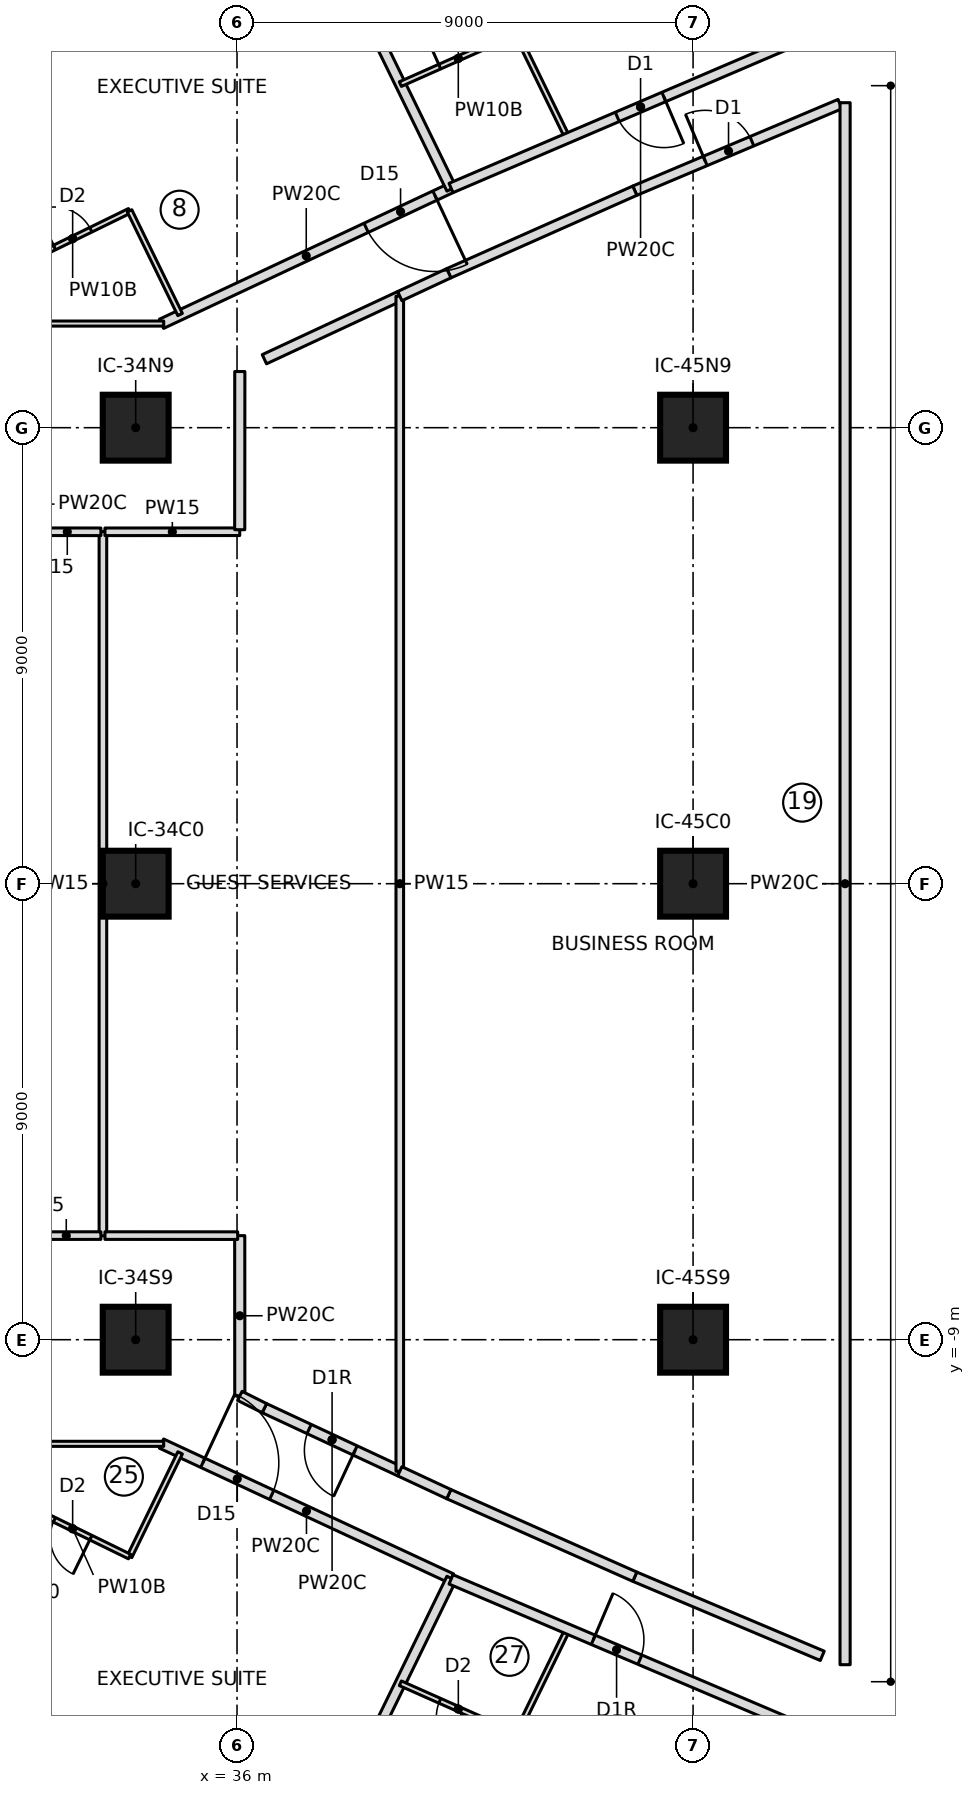
"""IFC4 building model, lengths in metres.
Left out: names, types, materials, properties, quantities, classifications, styles, units other than length and angle.
Written with IfcOpenShell. Run it as: python <this file> out.ifc"""

import sys

from ifc_helpers import new_model, si_unit, direction, frame, frame_2d, origin, origin_2d, place, context, subcontext, project, spatial, rectangle, extrude, element, fill, save


model = new_model("IFC4")
c1 = context("Model", 3, precision=1e-05, world=origin(), true_north=direction((0.0, 1.0)))
c2 = subcontext(c1, "Body", "Model", "MODEL_VIEW")
j1 = project(units=[si_unit("LENGTHUNIT", "METRE"), si_unit("PLANEANGLEUNIT", "RADIAN")], contexts=[c1])
p1 = place(None, origin())
s1 = spatial("IfcSite", under=j1, at=p1, CompositionType="ELEMENT")
p2 = place(p1, origin())
s2 = spatial("IfcBuilding", under=s1, at=p2, CompositionType="ELEMENT")
p3 = place(p2, frame((0.0, 0.0, 50.25)))
s3 = spatial("IfcBuildingStorey", under=s2, at=p3, CompositionType="ELEMENT", Elevation=50.25)
for number, where, z_axis, x_axis in (
    (1, (34.0, -9.0, 0.0), (0.0, 0.0, 1.0), (1.0, 0.0, 0.0)),
    (2, (34.0, 0.0, 0.0), (0.0, 0.0, 1.0), (1.0, 0.0, 0.0)),
    (3, (34.0, 9.0, 0.0), (0.0, 0.0, 1.0), (1.0, 0.0, 0.0)),
    (4, (45.0, -9.0, 0.0), (0.0, 0.0, 1.0), (1.0, 0.0, 0.0)),
    (5, (45.0, 0.0, 0.0), (0.0, 0.0, 1.0), (1.0, 0.0, 0.0)),
    (6, (45.0, 9.0, 0.0), (0.0, 0.0, 1.0), (1.0, 0.0, 0.0)),
):
    element("IfcColumn", number, at=place(p3, frame(where, z_axis=z_axis, x_axis=x_axis)), inside=s3, PredefinedType="COLUMN", context=c2, shape_type="SweptSolid", body=[
        extrude(rectangle(XDim=1.3, YDim=1.3, at=origin_2d()), origin(), (0.0, 0.0, 1.0), 3.55),
    ])
p4 = place(p3, frame((40.223, 13.73, 0.0), z_axis=(0.0, 0.0, 1.0), x_axis=(-0.905363217407, -0.424638015923, 0.0)))
e7 = element("IfcWall", 7, at=p4, inside=s3, PredefinedType="PARTITIONING", context=c2, shape_type="SweptSolid", body=[
    extrude(rectangle(XDim=6.312, YDim=0.2, at=frame_2d((3.156, 0.0))), origin(), (0.0, 0.0, 1.0), 3.25),
])
p5 = place(p4, frame((0.35, 0.0, 0.0)))
e8 = element("IfcOpeningElement", 8, at=p5, cuts=e7, PredefinedType="OPENING", context=c2, shape_type="SweptSolid", body=[
    extrude(rectangle(XDim=1.5, YDim=2.1, at=frame_2d((0.75, 1.05))), frame((0.0, 0.11, 0.0), z_axis=(0.0, -1.0, 0.0), x_axis=(1.0, 0.0, 0.0)), (0.0, 0.0, 1.0), 0.22),
])
p6 = place(p3, frame((31.633, 12.182, 0.0), z_axis=(0.0, 0.0, 1.0), x_axis=(0.89845285455, 0.439070003702, 0.0)))
e9 = element("IfcWall", 9, at=p6, inside=s3, PredefinedType="PARTITIONING", context=c2, shape_type="SweptSolid", body=[
    extrude(rectangle(XDim=2.5, YDim=0.1, at=frame_2d((1.25, 0.0))), origin(), (0.0, 0.0, 1.0), 3.25),
])
p7 = place(p6, frame((0.85, 0.0, 0.0)))
e10 = element("IfcOpeningElement", 10, at=p7, cuts=e9, PredefinedType="OPENING", context=c2, shape_type="SweptSolid", body=[
    extrude(rectangle(XDim=0.8, YDim=2.1, at=frame_2d((0.4, 1.05))), frame((0.0, 0.06, 0.0), z_axis=(0.0, -1.0, 0.0), x_axis=(1.0, 0.0, 0.0)), (0.0, 0.0, 1.0), 0.12),
])
p8 = place(p3, frame((33.879, 13.28, 0.0), z_axis=(0.0, 0.0, 1.0), x_axis=(0.438227154656, -0.898864261678, 0.0)))
e11 = element("IfcWall", 11, at=p8, inside=s3, PredefinedType="PARTITIONING", context=c2, shape_type="SweptSolid", body=[
    extrude(rectangle(XDim=2.277, YDim=0.1, at=frame_2d((1.138, 0.0))), origin(), (0.0, 0.0, 1.0), 3.25),
])
p9 = place(p3, frame((40.232, 13.712, 0.0), z_axis=(0.0, 0.0, 1.0), x_axis=(-0.438202247191, 0.898876404494, 0.0)))
e12 = element("IfcWall", 12, at=p9, inside=s3, PredefinedType="PARTITIONING", context=c2, shape_type="SweptSolid", body=[
    extrude(rectangle(XDim=7.605, YDim=0.2, at=frame_2d((3.802, 0.0))), origin(), (0.0, 0.0, 1.0), 3.25),
])
p10 = place(p3, frame((39.223, 15.781, 0.0), z_axis=(0.0, 0.0, 1.0), x_axis=(0.914000607553, 0.405712816401, 0.0)))
e13 = element("IfcWall", 13, at=p10, inside=s3, PredefinedType="PARTITIONING", context=c2, shape_type="SweptSolid", body=[
    extrude(rectangle(XDim=2.501, YDim=0.1, at=frame_2d((1.251, 0.0))), origin(), (0.0, 0.0, 1.0), 3.25),
])
p11 = place(p10, frame((0.85, 0.0, 0.0)))
e14 = element("IfcOpeningElement", 14, at=p11, cuts=e13, PredefinedType="OPENING", context=c2, shape_type="SweptSolid", body=[
    extrude(rectangle(XDim=0.8, YDim=2.1, at=frame_2d((0.4, 1.05))), frame((0.0, 0.06, 0.0), z_axis=(0.0, -1.0, 0.0), x_axis=(1.0, 0.0, 0.0)), (0.0, 0.0, 1.0), 0.12),
])
p12 = place(p3, frame((41.51, 16.796, 0.0), z_axis=(0.0, 0.0, 1.0), x_axis=(0.4381470535, -0.898903309321, 0.0)))
e15 = element("IfcWall", 15, at=p12, inside=s3, PredefinedType="PARTITIONING", context=c2, shape_type="SweptSolid", body=[
    extrude(rectangle(XDim=2.278, YDim=0.1, at=frame_2d((1.139, 0.0))), origin(), (0.0, 0.0, 1.0), 3.25),
])
p13 = place(p3, frame((34.509, -11.05, 0.0), z_axis=(0.0, 0.0, 1.0), x_axis=(0.906710104698, -0.421754414368, 0.0)))
e16 = element("IfcWall", 16, at=p13, inside=s3, PredefinedType="PARTITIONING", context=c2, shape_type="SweptSolid", body=[
    extrude(rectangle(XDim=6.312, YDim=0.2, at=frame_2d((3.156, 0.0))), origin(), (0.0, 0.0, 1.0), 3.25),
])
p14 = place(p13, frame((0.9, 0.0, 0.0)))
e17 = element("IfcOpeningElement", 17, at=p14, cuts=e16, PredefinedType="OPENING", context=c2, shape_type="SweptSolid", body=[
    extrude(rectangle(XDim=1.5, YDim=2.1, at=frame_2d((0.75, 1.05))), frame((0.0, 0.11, 0.0), z_axis=(0.0, -1.0, 0.0), x_axis=(1.0, 0.0, 0.0)), (0.0, 0.0, 1.0), 0.22),
])
p15 = place(p3, frame((34.877, -11.233, 0.0), z_axis=(0.0, 0.0, 1.0), x_axis=(-0.438227154656, -0.898864261678, 0.0)))
e18 = element("IfcWall", 18, at=p15, inside=s3, PredefinedType="PARTITIONING", context=c2, shape_type="SweptSolid", body=[
    extrude(rectangle(XDim=2.277, YDim=0.1, at=frame_2d((1.138, 0.0))), origin(), (0.0, 0.0, 1.0), 3.25),
])
p16 = place(p3, frame((33.879, -13.28, 0.0), z_axis=(0.0, 0.0, 1.0), x_axis=(-0.89845285455, 0.439070003702, 0.0)))
e19 = element("IfcWall", 19, at=p16, inside=s3, PredefinedType="PARTITIONING", context=c2, shape_type="SweptSolid", body=[
    extrude(rectangle(XDim=2.5, YDim=0.1, at=frame_2d((1.25, 0.0))), origin(), (0.0, 0.0, 1.0), 3.25),
])
p17 = place(p16, frame((0.85, 0.0, 0.0)))
e20 = element("IfcOpeningElement", 20, at=p17, cuts=e19, PredefinedType="OPENING", context=c2, shape_type="SweptSolid", body=[
    extrude(rectangle(XDim=0.8, YDim=2.1, at=frame_2d((0.4, 1.05))), frame((0.0, 0.06, 0.0), z_axis=(0.0, -1.0, 0.0), x_axis=(1.0, 0.0, 0.0)), (0.0, 0.0, 1.0), 0.12),
])
p18 = place(p3, frame((36.899, -20.548, 0.0), z_axis=(0.0, 0.0, 1.0), x_axis=(0.438202247191, 0.898876404494, 0.0)))
e21 = element("IfcWall", 21, at=p18, inside=s3, PredefinedType="PARTITIONING", context=c2, shape_type="SweptSolid", body=[
    extrude(rectangle(XDim=7.605, YDim=0.2, at=frame_2d((3.802, 0.0))), origin(), (0.0, 0.0, 1.0), 3.25),
])
p19 = place(p3, frame((42.508, -14.748, 0.0), z_axis=(0.0, 0.0, 1.0), x_axis=(-0.4381470535, -0.898903309321, 0.0)))
e22 = element("IfcWall", 22, at=p19, inside=s3, PredefinedType="PARTITIONING", context=c2, shape_type="SweptSolid", body=[
    extrude(rectangle(XDim=2.278, YDim=0.1, at=frame_2d((1.139, 0.0))), origin(), (0.0, 0.0, 1.0), 3.25),
])
p20 = place(p3, frame((41.51, -16.796, 0.0), z_axis=(0.0, 0.0, 1.0), x_axis=(-0.914000607553, 0.405712816401, 0.0)))
e23 = element("IfcWall", 23, at=p20, inside=s3, PredefinedType="PARTITIONING", context=c2, shape_type="SweptSolid", body=[
    extrude(rectangle(XDim=2.501, YDim=0.1, at=frame_2d((1.251, 0.0))), origin(), (0.0, 0.0, 1.0), 3.25),
])
p21 = place(p20, frame((0.85, 0.0, 0.0)))
e24 = element("IfcOpeningElement", 24, at=p21, cuts=e23, PredefinedType="OPENING", context=c2, shape_type="SweptSolid", body=[
    extrude(rectangle(XDim=0.8, YDim=2.1, at=frame_2d((0.4, 1.05))), frame((0.0, 0.06, 0.0), z_axis=(0.0, -1.0, 0.0), x_axis=(1.0, 0.0, 0.0)), (0.0, 0.0, 1.0), 0.12),
])
p22 = place(p3, frame((33.353, -6.95, 0.0), z_axis=(0.0, 0.0, 1.0), x_axis=(0.0, 1.0, 0.0)))
e25 = element("IfcWall", 25, at=p22, inside=s3, PredefinedType="PARTITIONING", context=c2, shape_type="SweptSolid", body=[
    extrude(rectangle(XDim=13.9, YDim=0.15, at=frame_2d((6.95, 0.0))), origin(), (0.0, 0.0, 1.0), 3.25),
])
p23 = place(p3, frame((39.212, -11.597, 0.0), z_axis=(0.0, 0.0, 1.0), x_axis=(-0.906348100281, 0.422531798943, 0.0)))
e26 = element("IfcWall", 26, at=p23, inside=s3, PredefinedType="PARTITIONING", context=c2, shape_type="SweptSolid", body=[
    extrude(rectangle(XDim=2.948, YDim=0.2, at=frame_2d((1.474, 0.0))), origin(), (0.0, 0.0, 1.0), 3.25),
])
p24 = place(p23, frame((0.974, 0.0, 0.0)))
e27 = element("IfcOpeningElement", 27, at=p24, cuts=e26, PredefinedType="OPENING", context=c2, shape_type="SweptSolid", body=[
    extrude(rectangle(XDim=1.0, YDim=2.1, at=frame_2d((0.5, 1.05))), frame((0.0, 0.11, 0.0), z_axis=(0.0, -1.0, 0.0), x_axis=(1.0, 0.0, 0.0)), (0.0, 0.0, 1.0), 0.22),
])
p25 = place(p3, frame((36.54, 10.351, 0.0), z_axis=(0.0, 0.0, 1.0), x_axis=(0.906348100281, 0.422531798943, 0.0)))
e28 = element("IfcWall", 28, at=p25, inside=s3, PredefinedType="PARTITIONING", context=c2, shape_type="SweptSolid", body=[
    extrude(rectangle(XDim=2.948, YDim=0.2, at=frame_2d((1.474, 0.0))), origin(), (0.0, 0.0, 1.0), 3.25),
])
p26 = place(p3, frame((39.212, -11.597, 0.0), z_axis=(0.0, 0.0, 1.0), x_axis=(0.0, 1.0, 0.0)))
e29 = element("IfcWall", 29, at=p26, inside=s3, PredefinedType="PARTITIONING", context=c2, shape_type="SweptSolid", body=[
    extrude(rectangle(XDim=23.193, YDim=0.15, at=frame_2d((11.597, 0.0))), origin(), (0.0, 0.0, 1.0), 3.25),
])
p27 = place(p3, frame((43.85, 13.677, 0.0), z_axis=(0.0, 0.0, 1.0), x_axis=(0.921265924084, 0.388933281068, 0.0)))
e30 = element("IfcWall", 30, at=p27, inside=s3, PredefinedType="PARTITIONING", context=c2, shape_type="SweptSolid", body=[
    extrude(rectangle(XDim=4.396, YDim=0.2, at=frame_2d((2.198, 0.0))), origin(), (0.0, 0.0, 1.0), 3.25),
])
p28 = place(p27, frame((1.508, 0.0, 0.0)))
e31 = element("IfcOpeningElement", 31, at=p28, cuts=e30, PredefinedType="OPENING", context=c2, shape_type="SweptSolid", body=[
    extrude(rectangle(XDim=1.0, YDim=2.1, at=frame_2d((0.5, 1.05))), frame((0.0, 0.11, 0.0), z_axis=(0.0, -1.0, 0.0), x_axis=(1.0, 0.0, 0.0)), (0.0, 0.0, 1.0), 0.22),
])
p29 = place(p3, frame((40.18, 12.048, 0.0), z_axis=(0.0, 0.0, 1.0), x_axis=(0.913986953061, 0.405743576209, 0.0)))
e32 = element("IfcWall", 32, at=p29, inside=s3, PredefinedType="PARTITIONING", context=c2, shape_type="SweptSolid", body=[
    extrude(rectangle(XDim=4.016, YDim=0.2, at=frame_2d((2.008, 0.0))), origin(), (0.0, 0.0, 1.0), 3.25),
])
p30 = place(p3, frame((47.55, -15.239, 0.0), z_axis=(0.0, 0.0, 1.0), x_axis=(-0.921269894054, 0.388923877269, 0.0)))
e33 = element("IfcWall", 33, at=p30, inside=s3, PredefinedType="PARTITIONING", context=c2, shape_type="SweptSolid", body=[
    extrude(rectangle(XDim=4.016, YDim=0.2, at=frame_2d((2.008, 0.0))), origin(), (0.0, 0.0, 1.0), 3.25),
])
p31 = place(p3, frame((43.85, -13.677, 0.0), z_axis=(0.0, 0.0, 1.0), x_axis=(-0.913986953061, 0.405743576209, 0.0)))
e34 = element("IfcWall", 34, at=p31, inside=s3, PredefinedType="PARTITIONING", context=c2, shape_type="SweptSolid", body=[
    extrude(rectangle(XDim=4.016, YDim=0.2, at=frame_2d((2.008, 0.0))), origin(), (0.0, 0.0, 1.0), 3.25),
])
for number, where, z_axis, x_axis in (
    (35, (40.18, -12.048, 0.0), (0.0, 0.0, 1.0), (-0.906, 0.423, 0.0)),
    (36, (39.212, 11.597, 0.0), (0.0, 0.0, 1.0), (0.906, 0.423, 0.0)),
):
    element("IfcWall", number, at=place(p3, frame(where, z_axis=z_axis, x_axis=x_axis)), inside=s3, PredefinedType="PARTITIONING", context=c2, shape_type="SweptSolid", body=[
        extrude(rectangle(XDim=1.068, YDim=0.2, at=frame_2d((0.534, 0.0))), origin(), (0.0, 0.0, 1.0), 3.25),
    ])
for number, where, z_axis, x_axis in (
    (37, (34.553, 11.055, 0.0), (0.0, 0.0, 1.0), (-1.0, 0.0, 0.0)),
    (38, (32.182, -11.055, 0.0), (0.0, 0.0, 1.0), (1.0, 0.0, 0.0)),
):
    element("IfcWall", number, at=place(p3, frame(where, z_axis=z_axis, x_axis=x_axis)), inside=s3, PredefinedType="PARTITIONING", context=c2, shape_type="SweptSolid", body=[
        extrude(rectangle(XDim=2.371, YDim=0.1, at=frame_2d((1.186, 0.0))), origin(), (0.0, 0.0, 1.0), 3.25),
    ])
p32 = place(p3, frame((47.704, 16.931, 0.0), z_axis=(0.0, 0.0, 1.0), x_axis=(-0.919360612497, -0.39341589214, 0.0)))
e39 = element("IfcWall", 39, at=p32, inside=s3, PredefinedType="PARTITIONING", context=c2, shape_type="SweptSolid", body=[
    extrude(rectangle(XDim=8.137, YDim=0.2, at=frame_2d((4.068, 0.0))), origin(), (0.0, 0.0, 1.0), 3.25),
])
p33 = place(p32, frame((3.568, 0.0, 0.0)))
e40 = element("IfcOpeningElement", 40, at=p33, cuts=e39, PredefinedType="OPENING", context=c2, shape_type="SweptSolid", body=[
    extrude(rectangle(XDim=1.0, YDim=2.1, at=frame_2d((0.5, 1.05))), frame((0.0, 0.11, 0.0), z_axis=(0.0, -1.0, 0.0), x_axis=(1.0, 0.0, 0.0)), (0.0, 0.0, 1.0), 0.22),
])
p34 = place(p3, frame((40.223, -13.73, 0.0), z_axis=(0.0, 0.0, 1.0), x_axis=(0.920292261621, -0.391231585127, 0.0)))
e41 = element("IfcWall", 41, at=p34, inside=s3, PredefinedType="PARTITIONING", context=c2, shape_type="SweptSolid", body=[
    extrude(rectangle(XDim=8.129, YDim=0.2, at=frame_2d((4.064, 0.0))), origin(), (0.0, 0.0, 1.0), 3.25),
])
p35 = place(p34, frame((3.05, 0.0, 0.0)))
e42 = element("IfcOpeningElement", 42, at=p35, cuts=e41, PredefinedType="OPENING", context=c2, shape_type="SweptSolid", body=[
    extrude(rectangle(XDim=1.0, YDim=2.1, at=frame_2d((0.5, 1.05))), frame((0.0, 0.11, 0.0), z_axis=(0.0, -1.0, 0.0), x_axis=(1.0, 0.0, 0.0)), (0.0, 0.0, 1.0), 0.22),
])
p36 = place(p3, frame((33.313, -6.945, 0.0), z_axis=(0.0, 0.0, 1.0), x_axis=(-0.999999744625, -0.00071466839, 0.0)))
e43 = element("IfcWall", 43, at=p36, inside=s3, PredefinedType="PARTITIONING", context=c2, shape_type="SweptSolid", body=[
    extrude(rectangle(XDim=1.366, YDim=0.15, at=frame_2d((0.683, 0.0))), origin(), (0.0, 0.0, 1.0), 3.25),
])
p37 = place(p3, frame((31.987, 6.946, 0.0), z_axis=(0.0, 0.0, 1.0), x_axis=(0.999999728974, -0.000736241288, 0.0)))
e44 = element("IfcWall", 44, at=p37, inside=s3, PredefinedType="PARTITIONING", context=c2, shape_type="SweptSolid", body=[
    extrude(rectangle(XDim=1.326, YDim=0.15, at=frame_2d((0.663, 0.0))), origin(), (0.0, 0.0, 1.0), 3.25),
])
p38 = place(p3, frame((36.055, -10.108, 0.0), z_axis=(0.0, 0.0, 1.0), x_axis=(-0.000540415269, 0.999999853976, 0.0)))
e45 = element("IfcWall", 45, at=p38, inside=s3, PredefinedType="PARTITIONING", context=c2, shape_type="SweptSolid", body=[
    extrude(rectangle(XDim=3.162, YDim=0.2, at=frame_2d((1.581, 0.0))), origin(), (0.0, 0.0, 1.0), 3.25),
])
p39 = place(p3, frame((36.013, -6.946, 0.0), z_axis=(0.0, 0.0, 1.0), x_axis=(-0.999999930528, 0.000372751815, 0.0)))
e46 = element("IfcWall", 46, at=p39, inside=s3, PredefinedType="PARTITIONING", context=c2, shape_type="SweptSolid", body=[
    extrude(rectangle(XDim=2.62, YDim=0.15, at=frame_2d((1.31, 0.0))), origin(), (0.0, 0.0, 1.0), 3.25),
])
p40 = place(p3, frame((33.393, 6.945, 0.0), z_axis=(0.0, 0.0, 1.0), x_axis=(0.999999932604, 0.000367140866, 0.0)))
e47 = element("IfcWall", 47, at=p40, inside=s3, PredefinedType="PARTITIONING", context=c2, shape_type="SweptSolid", body=[
    extrude(rectangle(XDim=2.66, YDim=0.15, at=frame_2d((1.33, 0.0))), origin(), (0.0, 0.0, 1.0), 3.25),
])
p41 = place(p3, frame((36.053, 6.986, 0.0), z_axis=(0.0, 0.0, 1.0), x_axis=(0.000547345293, 0.999999850207, 0.0)))
e48 = element("IfcWall", 48, at=p41, inside=s3, PredefinedType="PARTITIONING", context=c2, shape_type="SweptSolid", body=[
    extrude(rectangle(XDim=3.122, YDim=0.2, at=frame_2d((1.561, 0.0))), origin(), (0.0, 0.0, 1.0), 3.25),
])
p42 = place(p3, frame((48.0, 15.414, 0.0), z_axis=(0.0, 0.0, 1.0), x_axis=(0.0, -1.0, 0.0)))
e49 = element("IfcWall", 49, at=p42, inside=s3, PredefinedType="PARTITIONING", context=c2, shape_type="SweptSolid", body=[
    extrude(rectangle(XDim=30.828, YDim=0.2, at=frame_2d((15.414, 0.0))), origin(), (0.0, 0.0, 1.0), 3.25),
])
p43 = place(p3, frame((36.54, -10.351, 0.0), z_axis=(0.0, 0.0, 1.0), x_axis=(-0.894337154042, 0.447393624116, 0.0)))
e50 = element("IfcWall", 50, at=p43, inside=s3, PredefinedType="PARTITIONING", context=c2, shape_type="SweptSolid", body=[
    extrude(rectangle(XDim=0.542, YDim=0.2, at=frame_2d((0.271, 0.0))), origin(), (0.0, 0.0, 1.0), 3.25),
])
p44 = place(p7, origin())
e51 = element("IfcDoor", 51, at=p44, inside=s3, OperationType="SINGLE_SWING_LEFT", PredefinedType="DOOR", context=c2, shape_type="SweptSolid", body=[
    extrude(rectangle(XDim=0.8, YDim=2.1, at=frame_2d((0.4, 1.05))), frame((0.0, 0.025, 0.0), z_axis=(0.0, -1.0, 0.0), x_axis=(1.0, 0.0, 0.0)), (0.0, 0.0, 1.0), 0.05),
])
fill(e10, e51)
p45 = place(p5, origin())
e52 = element("IfcDoor", 52, at=p45, inside=s3, OperationType="DOUBLE_DOOR_SINGLE_SWING", PredefinedType="DOOR", context=c2, shape_type="SweptSolid", body=[
    extrude(rectangle(XDim=1.5, YDim=2.1, at=frame_2d((0.75, 1.05))), frame((0.0, 0.025, 0.0), z_axis=(0.0, -1.0, 0.0), x_axis=(1.0, 0.0, 0.0)), (0.0, 0.0, 1.0), 0.05),
])
fill(e8, e52)
p46 = place(p11, origin())
e53 = element("IfcDoor", 53, at=p46, inside=s3, OperationType="SINGLE_SWING_LEFT", PredefinedType="DOOR", context=c2, shape_type="SweptSolid", body=[
    extrude(rectangle(XDim=0.8, YDim=2.1, at=frame_2d((0.4, 1.05))), frame((0.0, 0.025, 0.0), z_axis=(0.0, -1.0, 0.0), x_axis=(1.0, 0.0, 0.0)), (0.0, 0.0, 1.0), 0.05),
])
fill(e14, e53)
p47 = place(p33, origin())
e54 = element("IfcDoor", 54, at=p47, inside=s3, OperationType="SINGLE_SWING_LEFT", PredefinedType="DOOR", context=c2, shape_type="SweptSolid", body=[
    extrude(rectangle(XDim=1.0, YDim=2.1, at=frame_2d((0.5, 1.05))), frame((0.0, 0.025, 0.0), z_axis=(0.0, -1.0, 0.0), x_axis=(1.0, 0.0, 0.0)), (0.0, 0.0, 1.0), 0.05),
])
fill(e40, e54)
p48 = place(p17, origin())
e55 = element("IfcDoor", 55, at=p48, inside=s3, OperationType="SINGLE_SWING_LEFT", PredefinedType="DOOR", context=c2, shape_type="SweptSolid", body=[
    extrude(rectangle(XDim=0.8, YDim=2.1, at=frame_2d((0.4, 1.05))), frame((0.0, 0.025, 0.0), z_axis=(0.0, -1.0, 0.0), x_axis=(1.0, 0.0, 0.0)), (0.0, 0.0, 1.0), 0.05),
])
fill(e20, e55)
p49 = place(p14, origin())
e56 = element("IfcDoor", 56, at=p49, inside=s3, OperationType="DOUBLE_DOOR_SINGLE_SWING", PredefinedType="DOOR", context=c2, shape_type="SweptSolid", body=[
    extrude(rectangle(XDim=1.5, YDim=2.1, at=frame_2d((0.75, 1.05))), frame((0.0, 0.025, 0.0), z_axis=(0.0, -1.0, 0.0), x_axis=(1.0, 0.0, 0.0)), (0.0, 0.0, 1.0), 0.05),
])
fill(e17, e56)
p50 = place(p21, origin())
e57 = element("IfcDoor", 57, at=p50, inside=s3, OperationType="SINGLE_SWING_LEFT", PredefinedType="DOOR", context=c2, shape_type="SweptSolid", body=[
    extrude(rectangle(XDim=0.8, YDim=2.1, at=frame_2d((0.4, 1.05))), frame((0.0, 0.025, 0.0), z_axis=(0.0, -1.0, 0.0), x_axis=(1.0, 0.0, 0.0)), (0.0, 0.0, 1.0), 0.05),
])
fill(e24, e57)
p51 = place(p35, origin())
e58 = element("IfcDoor", 58, at=p51, inside=s3, OperationType="SINGLE_SWING_RIGHT", PredefinedType="DOOR", context=c2, shape_type="SweptSolid", body=[
    extrude(rectangle(XDim=1.0, YDim=2.1, at=frame_2d((0.5, 1.05))), frame((0.0, 0.025, 0.0), z_axis=(0.0, -1.0, 0.0), x_axis=(1.0, 0.0, 0.0)), (0.0, 0.0, 1.0), 0.05),
])
fill(e42, e58)
p52 = place(p24, origin())
e59 = element("IfcDoor", 59, at=p52, inside=s3, OperationType="SINGLE_SWING_RIGHT", PredefinedType="DOOR", context=c2, shape_type="SweptSolid", body=[
    extrude(rectangle(XDim=1.0, YDim=2.1, at=frame_2d((0.5, 1.05))), frame((0.0, 0.025, 0.0), z_axis=(0.0, -1.0, 0.0), x_axis=(1.0, 0.0, 0.0)), (0.0, 0.0, 1.0), 0.05),
])
fill(e27, e59)
p53 = place(p28, origin())
e60 = element("IfcDoor", 60, at=p53, inside=s3, OperationType="SINGLE_SWING_LEFT", PredefinedType="DOOR", context=c2, shape_type="SweptSolid", body=[
    extrude(rectangle(XDim=1.0, YDim=2.1, at=frame_2d((0.5, 1.05))), frame((0.0, 0.025, 0.0), z_axis=(0.0, -1.0, 0.0), x_axis=(1.0, 0.0, 0.0)), (0.0, 0.0, 1.0), 0.05),
])
fill(e31, e60)
save(model, sys.argv[1])
